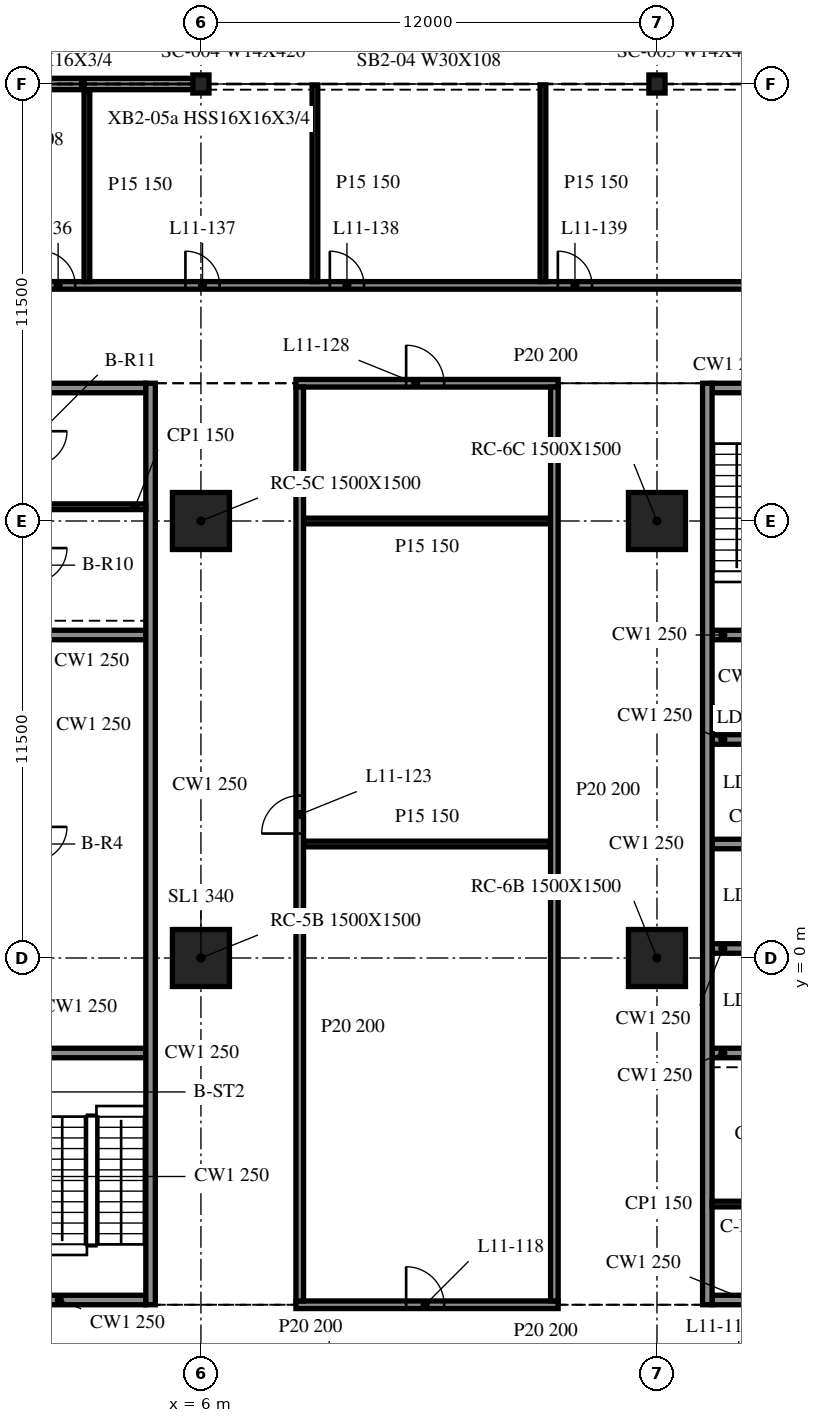
"""IFC4 building model, lengths in metres.
Left out: names, types, materials, properties, quantities, classifications, styles, units other than length and angle.
Written with IfcOpenShell. Run it as: python <this file> out.ifc"""

import sys

from ifc_helpers import new_model, si_unit, direction, frame, frame_2d, origin, origin_2d, place, context, subcontext, project, spatial, rectangle, i_section, extrude, element, fill, save


model = new_model("IFC4")
c1 = context("Model", 3, precision=1e-05, world=origin(), true_north=direction((0.0, 1.0)))
c2 = subcontext(c1, "Body", "Model", "MODEL_VIEW")
j1 = project(units=[si_unit("LENGTHUNIT", "METRE"), si_unit("PLANEANGLEUNIT", "RADIAN")], contexts=[c1])
p1 = place(None, origin())
s1 = spatial("IfcSite", under=j1, at=p1, CompositionType="ELEMENT")
p2 = place(p1, origin())
s2 = spatial("IfcBuilding", under=s1, at=p2, CompositionType="ELEMENT")
p3 = place(p2, frame((0.0, 0.0, 50.3)))
s3 = spatial("IfcBuildingStorey", under=s2, at=p3, CompositionType="ELEMENT", Elevation=50.3)
for number, where, z_axis, x_axis in (
    (1, (6.0, 0.0, -0.34), (0.0, 0.0, 1.0), (1.0, 0.0, 0.0)),
    (2, (6.0, 11.5, -0.34), (0.0, 0.0, 1.0), (1.0, 0.0, 0.0)),
    (3, (18.0, 0.0, -0.34), (0.0, 0.0, 1.0), (1.0, 0.0, 0.0)),
    (4, (18.0, 11.5, -0.34), (0.0, 0.0, 1.0), (1.0, 0.0, 0.0)),
):
    element("IfcColumn", number, at=place(p3, frame(where, z_axis=z_axis, x_axis=x_axis)), inside=s3, PredefinedType="COLUMN", context=c2, shape_type="SweptSolid", body=[
        extrude(rectangle(XDim=1.5, YDim=1.5, at=origin_2d()), origin(), (0.0, 0.0, 1.0), 4.3),
    ])
for number, where, z_axis, x_axis in (
    (5, (18.0, 23.0, -0.34), (0.0, 0.0, 1.0), (1.0, 0.0, 0.0)),
    (6, (6.0, 23.0, -0.34), (0.0, 0.0, 1.0), (1.0, 0.0, 0.0)),
):
    element("IfcColumn", number, at=place(p3, frame(where, z_axis=z_axis, x_axis=x_axis)), inside=s3, PredefinedType="COLUMN", context=c2, shape_type="SweptSolid", body=[
        extrude(i_section(OverallWidth=0.424, OverallDepth=0.475, WebThickness=0.048, FlangeThickness=0.077, at=origin_2d()), origin(), (0.0, 0.0, 1.0), 4.3),
    ])
p4 = place(p3, frame((5.976, 23.0, 0.0), z_axis=(0.0, 0.0, 1.0), x_axis=(-1.0, 0.0, 0.0)))
e7 = element("IfcWall", 7, at=p4, inside=s3, PredefinedType="NOTDEFINED", context=c2, shape_type="SweptSolid", body=[
    extrude(rectangle(XDim=11.952, YDim=0.3, at=frame_2d((5.976, 0.0))), origin(), (0.0, 0.0, 1.0), 3.203),
])
p5 = place(p3, frame((4.675, -9.125, 0.0), z_axis=(0.0, 0.0, 1.0), x_axis=(0.0, 1.0, 0.0)))
e8 = element("IfcWall", 8, at=p5, inside=s3, PredefinedType="SOLIDWALL", context=c2, shape_type="SweptSolid", body=[
    extrude(rectangle(XDim=24.25, YDim=0.25, at=frame_2d((12.125, 0.0))), origin(), (0.0, 0.0, 1.0), 3.96),
])
p6 = place(p3, frame((4.55, -9.0, 0.0), z_axis=(0.0, 0.0, 1.0), x_axis=(-1.0, 0.0, 0.0)))
e9 = element("IfcWall", 9, at=p6, inside=s3, PredefinedType="SOLIDWALL", context=c2, shape_type="SweptSolid", body=[
    extrude(rectangle(XDim=9.1, YDim=0.25, at=frame_2d((4.55, 0.0))), origin(), (0.0, 0.0, 1.0), 3.96),
])
p7 = place(p6, frame((3.65, 0.0, 0.0)))
e10 = element("IfcOpeningElement", 10, at=p7, cuts=e9, PredefinedType="OPENING", context=c2, shape_type="SweptSolid", body=[
    extrude(rectangle(XDim=1.8, YDim=2.1, at=frame_2d((0.9, 1.05))), frame((0.0, 0.135, 0.0), z_axis=(0.0, -1.0, 0.0), x_axis=(1.0, 0.0, 0.0)), (0.0, 0.0, 1.0), 0.27),
])
p8 = place(p3, frame((-4.55, 15.0, 0.0), z_axis=(0.0, 0.0, 1.0), x_axis=(1.0, 0.0, 0.0)))
e11 = element("IfcWall", 11, at=p8, inside=s3, PredefinedType="SOLIDWALL", context=c2, shape_type="SweptSolid", body=[
    extrude(rectangle(XDim=9.1, YDim=0.25, at=frame_2d((4.55, 0.0))), origin(), (0.0, 0.0, 1.0), 3.96),
])
p9 = place(p8, frame((3.65, 0.0, 0.0)))
e12 = element("IfcOpeningElement", 12, at=p9, cuts=e11, PredefinedType="OPENING", context=c2, shape_type="SweptSolid", body=[
    extrude(rectangle(XDim=1.8, YDim=2.1, at=frame_2d((0.9, 1.05))), frame((0.0, 0.135, 0.0), z_axis=(0.0, -1.0, 0.0), x_axis=(1.0, 0.0, 0.0)), (0.0, 0.0, 1.0), 0.27),
])
for number, where, z_axis, x_axis in (
    (13, (1.7, -2.5, 0.0), (0.0, 0.0, 1.0), (1.0, 0.0, 0.0)),
    (14, (1.7, 8.5, 0.0), (0.0, 0.0, 1.0), (1.0, 0.0, 0.0)),
):
    element("IfcWall", number, at=place(p3, frame(where, z_axis=z_axis, x_axis=x_axis)), inside=s3, PredefinedType="SOLIDWALL", context=c2, shape_type="SweptSolid", body=[
        extrude(rectangle(XDim=2.85, YDim=0.25, at=frame_2d((1.425, 0.0))), origin(), (0.0, 0.0, 1.0), 3.96),
    ])
p10 = place(p3, frame((1.7, 11.875, 0.0), z_axis=(0.0, 0.0, 1.0), x_axis=(1.0, 0.0, 0.0)))
e15 = element("IfcWall", 15, at=p10, inside=s3, PredefinedType="PARTITIONING", context=c2, shape_type="SweptSolid", body=[
    extrude(rectangle(XDim=2.85, YDim=0.15, at=frame_2d((1.425, 0.0))), origin(), (0.0, 0.0, 1.0), 3.96),
])
p11 = place(p3, frame((19.325, 15.125, 0.0), z_axis=(0.0, 0.0, 1.0), x_axis=(0.0, -1.0, 0.0)))
e16 = element("IfcWall", 16, at=p11, inside=s3, PredefinedType="SOLIDWALL", context=c2, shape_type="SweptSolid", body=[
    extrude(rectangle(XDim=24.25, YDim=0.25, at=frame_2d((12.125, 0.0))), origin(), (0.0, 0.0, 1.0), 3.96),
])
p12 = place(p3, frame((28.55, -9.0, 0.0), z_axis=(0.0, 0.0, 1.0), x_axis=(-1.0, 0.0, 0.0)))
e17 = element("IfcWall", 17, at=p12, inside=s3, PredefinedType="SOLIDWALL", context=c2, shape_type="SweptSolid", body=[
    extrude(rectangle(XDim=9.1, YDim=0.25, at=frame_2d((4.55, 0.0))), origin(), (0.0, 0.0, 1.0), 3.96),
])
p13 = place(p12, frame((3.65, 0.0, 0.0)))
e18 = element("IfcOpeningElement", 18, at=p13, cuts=e17, PredefinedType="OPENING", context=c2, shape_type="SweptSolid", body=[
    extrude(rectangle(XDim=1.8, YDim=2.1, at=frame_2d((0.9, 1.05))), frame((0.0, 0.135, 0.0), z_axis=(0.0, -1.0, 0.0), x_axis=(1.0, 0.0, 0.0)), (0.0, 0.0, 1.0), 0.27),
])
p14 = place(p3, frame((19.45, 15.0, 0.0), z_axis=(0.0, 0.0, 1.0), x_axis=(1.0, 0.0, 0.0)))
e19 = element("IfcWall", 19, at=p14, inside=s3, PredefinedType="SOLIDWALL", context=c2, shape_type="SweptSolid", body=[
    extrude(rectangle(XDim=9.1, YDim=0.25, at=frame_2d((4.55, 0.0))), origin(), (0.0, 0.0, 1.0), 3.96),
])
p15 = place(p14, frame((3.65, 0.0, 0.0)))
e20 = element("IfcOpeningElement", 20, at=p15, cuts=e19, PredefinedType="OPENING", context=c2, shape_type="SweptSolid", body=[
    extrude(rectangle(XDim=1.8, YDim=2.1, at=frame_2d((0.9, 1.05))), frame((0.0, 0.135, 0.0), z_axis=(0.0, -1.0, 0.0), x_axis=(1.0, 0.0, 0.0)), (0.0, 0.0, 1.0), 0.27),
])
for number, where, z_axis, x_axis in (
    (21, (19.45, -2.5, 0.0), (0.0, 0.0, 1.0), (1.0, 0.0, 0.0)),
    (22, (19.45, 0.25, 0.0), (0.0, 0.0, 1.0), (1.0, 0.0, 0.0)),
    (23, (19.45, 3.0, 0.0), (0.0, 0.0, 1.0), (1.0, 0.0, 0.0)),
    (24, (19.45, 5.75, 0.0), (0.0, 0.0, 1.0), (1.0, 0.0, 0.0)),
    (25, (19.45, 8.5, 0.0), (0.0, 0.0, 1.0), (1.0, 0.0, 0.0)),
):
    element("IfcWall", number, at=place(p3, frame(where, z_axis=z_axis, x_axis=x_axis)), inside=s3, PredefinedType="SOLIDWALL", context=c2, shape_type="SweptSolid", body=[
        extrude(rectangle(XDim=2.85, YDim=0.25, at=frame_2d((1.425, 0.0))), origin(), (0.0, 0.0, 1.0), 3.96),
    ])
p16 = place(p3, frame((19.45, -6.475, 0.0), z_axis=(0.0, 0.0, 1.0), x_axis=(1.0, 0.0, 0.0)))
e26 = element("IfcWall", 26, at=p16, inside=s3, PredefinedType="PARTITIONING", context=c2, shape_type="SweptSolid", body=[
    extrude(rectangle(XDim=2.85, YDim=0.15, at=frame_2d((1.425, 0.0))), origin(), (0.0, 0.0, 1.0), 3.96),
])
p17 = place(p3, frame((8.5, -9.125, 0.0), z_axis=(0.0, 0.0, 1.0), x_axis=(1.0, 0.0, 0.0)))
e27 = element("IfcWall", 27, at=p17, inside=s3, PredefinedType="PARTITIONING", context=c2, shape_type="SweptSolid", body=[
    extrude(rectangle(XDim=6.9, YDim=0.2, at=frame_2d((3.45, 0.0))), origin(), (0.0, 0.0, 1.0), 3.96),
])
p18 = place(p17, frame((2.9, 0.0, 0.0)))
e28 = element("IfcOpeningElement", 28, at=p18, cuts=e27, PredefinedType="OPENING", context=c2, shape_type="SweptSolid", body=[
    extrude(rectangle(XDim=1.0, YDim=2.1, at=frame_2d((0.5, 1.05))), frame((0.0, 0.11, 0.0), z_axis=(0.0, -1.0, 0.0), x_axis=(1.0, 0.0, 0.0)), (0.0, 0.0, 1.0), 0.22),
])
for number, where, z_axis, x_axis in (
    (29, (8.7, 3.0, 0.0), (0.0, 0.0, 1.0), (1.0, 0.0, 0.0)),
    (30, (8.7, 11.5, 0.0), (0.0, 0.0, 1.0), (1.0, 0.0, 0.0)),
):
    element("IfcWall", number, at=place(p3, frame(where, z_axis=z_axis, x_axis=x_axis)), inside=s3, PredefinedType="PARTITIONING", context=c2, shape_type="SweptSolid", body=[
        extrude(rectangle(XDim=6.5, YDim=0.15, at=frame_2d((3.25, 0.0))), origin(), (0.0, 0.0, 1.0), 3.96),
    ])
p19 = place(p3, frame((8.5, 15.125, 0.0), z_axis=(0.0, 0.0, 1.0), x_axis=(1.0, 0.0, 0.0)))
e31 = element("IfcWall", 31, at=p19, inside=s3, PredefinedType="PARTITIONING", context=c2, shape_type="SweptSolid", body=[
    extrude(rectangle(XDim=6.9, YDim=0.2, at=frame_2d((3.45, 0.0))), origin(), (0.0, 0.0, 1.0), 3.96),
])
p20 = place(p19, frame((2.9, 0.0, 0.0)))
e32 = element("IfcOpeningElement", 32, at=p20, cuts=e31, PredefinedType="OPENING", context=c2, shape_type="SweptSolid", body=[
    extrude(rectangle(XDim=1.0, YDim=2.1, at=frame_2d((0.5, 1.05))), frame((0.0, 0.11, 0.0), z_axis=(0.0, -1.0, 0.0), x_axis=(1.0, 0.0, 0.0)), (0.0, 0.0, 1.0), 0.22),
])
p21 = place(p3, frame((-41.708, 17.7, 0.0), z_axis=(0.0, 0.0, 1.0), x_axis=(1.0, 0.0, 0.0)))
e33 = element("IfcWall", 33, at=p21, inside=s3, PredefinedType="PARTITIONING", context=c2, shape_type="SweptSolid", body=[
    extrude(rectangle(XDim=95.416, YDim=0.2, at=frame_2d((47.708, 0.0))), origin(), (0.0, 0.0, 1.0), 3.96),
])
p22 = place(p21, frame((7.5, 0.0, 0.0)))
e34 = element("IfcOpeningElement", 34, at=p22, cuts=e33, PredefinedType="OPENING", context=c2, shape_type="SweptSolid", body=[
    extrude(rectangle(XDim=0.9, YDim=2.1, at=frame_2d((0.45, 1.05))), frame((0.0, 0.11, 0.0), z_axis=(0.0, -1.0, 0.0), x_axis=(1.0, 0.0, 0.0)), (0.0, 0.0, 1.0), 0.22),
])
p23 = place(p21, frame((13.5, 0.0, 0.0)))
e35 = element("IfcOpeningElement", 35, at=p23, cuts=e33, PredefinedType="OPENING", context=c2, shape_type="SweptSolid", body=[
    extrude(rectangle(XDim=0.9, YDim=2.1, at=frame_2d((0.45, 1.05))), frame((0.0, 0.11, 0.0), z_axis=(0.0, -1.0, 0.0), x_axis=(1.0, 0.0, 0.0)), (0.0, 0.0, 1.0), 0.22),
])
p24 = place(p21, frame((19.5, 0.0, 0.0)))
e36 = element("IfcOpeningElement", 36, at=p24, cuts=e33, PredefinedType="OPENING", context=c2, shape_type="SweptSolid", body=[
    extrude(rectangle(XDim=0.9, YDim=2.1, at=frame_2d((0.45, 1.05))), frame((0.0, 0.11, 0.0), z_axis=(0.0, -1.0, 0.0), x_axis=(1.0, 0.0, 0.0)), (0.0, 0.0, 1.0), 0.22),
])
p25 = place(p21, frame((31.5, 0.0, 0.0)))
e37 = element("IfcOpeningElement", 37, at=p25, cuts=e33, PredefinedType="OPENING", context=c2, shape_type="SweptSolid", body=[
    extrude(rectangle(XDim=0.9, YDim=2.1, at=frame_2d((0.45, 1.05))), frame((0.0, 0.11, 0.0), z_axis=(0.0, -1.0, 0.0), x_axis=(1.0, 0.0, 0.0)), (0.0, 0.0, 1.0), 0.22),
])
p26 = place(p21, frame((34.5, 0.0, 0.0)))
e38 = element("IfcOpeningElement", 38, at=p26, cuts=e33, PredefinedType="OPENING", context=c2, shape_type="SweptSolid", body=[
    extrude(rectangle(XDim=0.9, YDim=2.1, at=frame_2d((0.45, 1.05))), frame((0.0, 0.11, 0.0), z_axis=(0.0, -1.0, 0.0), x_axis=(1.0, 0.0, 0.0)), (0.0, 0.0, 1.0), 0.22),
])
p27 = place(p21, frame((43.5, 0.0, 0.0)))
e39 = element("IfcOpeningElement", 39, at=p27, cuts=e33, PredefinedType="OPENING", context=c2, shape_type="SweptSolid", body=[
    extrude(rectangle(XDim=0.9, YDim=2.1, at=frame_2d((0.45, 1.05))), frame((0.0, 0.11, 0.0), z_axis=(0.0, -1.0, 0.0), x_axis=(1.0, 0.0, 0.0)), (0.0, 0.0, 1.0), 0.22),
])
p28 = place(p21, frame((47.3, 0.0, 0.0)))
e40 = element("IfcOpeningElement", 40, at=p28, cuts=e33, PredefinedType="OPENING", context=c2, shape_type="SweptSolid", body=[
    extrude(rectangle(XDim=0.9, YDim=2.1, at=frame_2d((0.45, 1.05))), frame((0.0, 0.11, 0.0), z_axis=(0.0, -1.0, 0.0), x_axis=(1.0, 0.0, 0.0)), (0.0, 0.0, 1.0), 0.22),
])
p29 = place(p21, frame((51.1, 0.0, 0.0)))
e41 = element("IfcOpeningElement", 41, at=p29, cuts=e33, PredefinedType="OPENING", context=c2, shape_type="SweptSolid", body=[
    extrude(rectangle(XDim=0.9, YDim=2.1, at=frame_2d((0.45, 1.05))), frame((0.0, 0.11, 0.0), z_axis=(0.0, -1.0, 0.0), x_axis=(1.0, 0.0, 0.0)), (0.0, 0.0, 1.0), 0.22),
])
p30 = place(p21, frame((57.1, 0.0, 0.0)))
e42 = element("IfcOpeningElement", 42, at=p30, cuts=e33, PredefinedType="OPENING", context=c2, shape_type="SweptSolid", body=[
    extrude(rectangle(XDim=0.9, YDim=2.1, at=frame_2d((0.45, 1.05))), frame((0.0, 0.11, 0.0), z_axis=(0.0, -1.0, 0.0), x_axis=(1.0, 0.0, 0.0)), (0.0, 0.0, 1.0), 0.22),
])
p31 = place(p21, frame((69.1, 0.0, 0.0)))
e43 = element("IfcOpeningElement", 43, at=p31, cuts=e33, PredefinedType="OPENING", context=c2, shape_type="SweptSolid", body=[
    extrude(rectangle(XDim=0.9, YDim=2.1, at=frame_2d((0.45, 1.05))), frame((0.0, 0.11, 0.0), z_axis=(0.0, -1.0, 0.0), x_axis=(1.0, 0.0, 0.0)), (0.0, 0.0, 1.0), 0.22),
])
p32 = place(p21, frame((72.1, 0.0, 0.0)))
e44 = element("IfcOpeningElement", 44, at=p32, cuts=e33, PredefinedType="OPENING", context=c2, shape_type="SweptSolid", body=[
    extrude(rectangle(XDim=0.9, YDim=2.1, at=frame_2d((0.45, 1.05))), frame((0.0, 0.11, 0.0), z_axis=(0.0, -1.0, 0.0), x_axis=(1.0, 0.0, 0.0)), (0.0, 0.0, 1.0), 0.22),
])
p33 = place(p21, frame((81.1, 0.0, 0.0)))
e45 = element("IfcOpeningElement", 45, at=p33, cuts=e33, PredefinedType="OPENING", context=c2, shape_type="SweptSolid", body=[
    extrude(rectangle(XDim=0.9, YDim=2.1, at=frame_2d((0.45, 1.05))), frame((0.0, 0.11, 0.0), z_axis=(0.0, -1.0, 0.0), x_axis=(1.0, 0.0, 0.0)), (0.0, 0.0, 1.0), 0.22),
])
p34 = place(p21, frame((87.1, 0.0, 0.0)))
e46 = element("IfcOpeningElement", 46, at=p34, cuts=e33, PredefinedType="OPENING", context=c2, shape_type="SweptSolid", body=[
    extrude(rectangle(XDim=0.9, YDim=2.1, at=frame_2d((0.45, 1.05))), frame((0.0, 0.11, 0.0), z_axis=(0.0, -1.0, 0.0), x_axis=(1.0, 0.0, 0.0)), (0.0, 0.0, 1.0), 0.22),
])
p35 = place(p3, frame((3.0, 17.8, 0.0), z_axis=(0.0, 0.0, 1.0), x_axis=(0.0, 1.0, 0.0)))
e47 = element("IfcWall", 47, at=p35, inside=s3, PredefinedType="PARTITIONING", context=c2, shape_type="SweptSolid", body=[
    extrude(rectangle(XDim=5.05, YDim=0.15, at=frame_2d((2.525, 0.0))), origin(), (0.0, 0.0, 1.0), 3.96),
])
p36 = place(p3, frame((8.6, -9.025, 0.0), z_axis=(0.0, 0.0, 1.0), x_axis=(0.0, 1.0, 0.0)))
e48 = element("IfcWall", 48, at=p36, inside=s3, PredefinedType="PARTITIONING", context=c2, shape_type="SweptSolid", body=[
    extrude(rectangle(XDim=24.05, YDim=0.2, at=frame_2d((12.025, 0.0))), origin(), (0.0, 0.0, 1.0), 3.96),
])
p37 = place(p36, frame((12.3, 0.0, 0.0)))
e49 = element("IfcOpeningElement", 49, at=p37, cuts=e48, PredefinedType="OPENING", context=c2, shape_type="SweptSolid", body=[
    extrude(rectangle(XDim=1.0, YDim=2.1, at=frame_2d((0.5, 1.05))), frame((0.0, 0.11, 0.0), z_axis=(0.0, -1.0, 0.0), x_axis=(1.0, 0.0, 0.0)), (0.0, 0.0, 1.0), 0.22),
])
for number, where, z_axis, x_axis in (
    (50, (9.0, 17.8, 0.0), (0.0, 0.0, 1.0), (0.0, 1.0, 0.0)),
    (51, (15.0, 17.8, 0.0), (0.0, 0.0, 1.0), (0.0, 1.0, 0.0)),
):
    element("IfcWall", number, at=place(p3, frame(where, z_axis=z_axis, x_axis=x_axis)), inside=s3, PredefinedType="PARTITIONING", context=c2, shape_type="SweptSolid", body=[
        extrude(rectangle(XDim=5.175, YDim=0.15, at=frame_2d((2.587, 0.0))), origin(), (0.0, 0.0, 1.0), 3.96),
    ])
p38 = place(p3, frame((15.3, -9.025, 0.0), z_axis=(0.0, 0.0, 1.0), x_axis=(0.0, 1.0, 0.0)))
e52 = element("IfcWall", 52, at=p38, inside=s3, PredefinedType="PARTITIONING", context=c2, shape_type="SweptSolid", body=[
    extrude(rectangle(XDim=24.05, YDim=0.2, at=frame_2d((12.025, 0.0))), origin(), (0.0, 0.0, 1.0), 3.96),
])
p39 = place(p18, origin())
e53 = element("IfcDoor", 53, at=p39, inside=s3, OperationType="SINGLE_SWING_LEFT", PredefinedType="DOOR", context=c2, shape_type="SweptSolid", body=[
    extrude(rectangle(XDim=1.0, YDim=2.1, at=frame_2d((0.5, 1.05))), frame((0.0, 0.025, 0.0), z_axis=(0.0, -1.0, 0.0), x_axis=(1.0, 0.0, 0.0)), (0.0, 0.0, 1.0), 0.05),
])
fill(e28, e53)
p40 = place(p37, origin())
e54 = element("IfcDoor", 54, at=p40, inside=s3, OperationType="SINGLE_SWING_LEFT", PredefinedType="DOOR", context=c2, shape_type="SweptSolid", body=[
    extrude(rectangle(XDim=1.0, YDim=2.1, at=frame_2d((0.5, 1.05))), frame((0.0, 0.025, 0.0), z_axis=(0.0, -1.0, 0.0), x_axis=(1.0, 0.0, 0.0)), (0.0, 0.0, 1.0), 0.05),
])
fill(e49, e54)
p41 = place(p20, origin())
e55 = element("IfcDoor", 55, at=p41, inside=s3, OperationType="SINGLE_SWING_RIGHT", PredefinedType="DOOR", context=c2, shape_type="SweptSolid", body=[
    extrude(rectangle(XDim=1.0, YDim=2.1, at=frame_2d((0.5, 1.05))), frame((0.0, 0.025, 0.0), z_axis=(0.0, -1.0, 0.0), x_axis=(1.0, 0.0, 0.0)), (0.0, 0.0, 1.0), 0.05),
])
fill(e32, e55)
p42 = place(p27, origin())
e56 = element("IfcDoor", 56, at=p42, inside=s3, OperationType="SINGLE_SWING_LEFT", PredefinedType="DOOR", context=c2, shape_type="SweptSolid", body=[
    extrude(rectangle(XDim=0.9, YDim=2.1, at=frame_2d((0.45, 1.05))), frame((0.0, 0.025, 0.0), z_axis=(0.0, -1.0, 0.0), x_axis=(1.0, 0.0, 0.0)), (0.0, 0.0, 1.0), 0.05),
])
fill(e39, e56)
p43 = place(p28, origin())
e57 = element("IfcDoor", 57, at=p43, inside=s3, OperationType="SINGLE_SWING_RIGHT", PredefinedType="DOOR", context=c2, shape_type="SweptSolid", body=[
    extrude(rectangle(XDim=0.9, YDim=2.1, at=frame_2d((0.45, 1.05))), frame((0.0, 0.025, 0.0), z_axis=(0.0, -1.0, 0.0), x_axis=(1.0, 0.0, 0.0)), (0.0, 0.0, 1.0), 0.05),
])
fill(e40, e57)
p44 = place(p29, origin())
e58 = element("IfcDoor", 58, at=p44, inside=s3, OperationType="SINGLE_SWING_RIGHT", PredefinedType="DOOR", context=c2, shape_type="SweptSolid", body=[
    extrude(rectangle(XDim=0.9, YDim=2.1, at=frame_2d((0.45, 1.05))), frame((0.0, 0.025, 0.0), z_axis=(0.0, -1.0, 0.0), x_axis=(1.0, 0.0, 0.0)), (0.0, 0.0, 1.0), 0.05),
])
fill(e41, e58)
p45 = place(p30, origin())
e59 = element("IfcDoor", 59, at=p45, inside=s3, OperationType="SINGLE_SWING_RIGHT", PredefinedType="DOOR", context=c2, shape_type="SweptSolid", body=[
    extrude(rectangle(XDim=0.9, YDim=2.1, at=frame_2d((0.45, 1.05))), frame((0.0, 0.025, 0.0), z_axis=(0.0, -1.0, 0.0), x_axis=(1.0, 0.0, 0.0)), (0.0, 0.0, 1.0), 0.05),
])
fill(e42, e59)
save(model, sys.argv[1])
